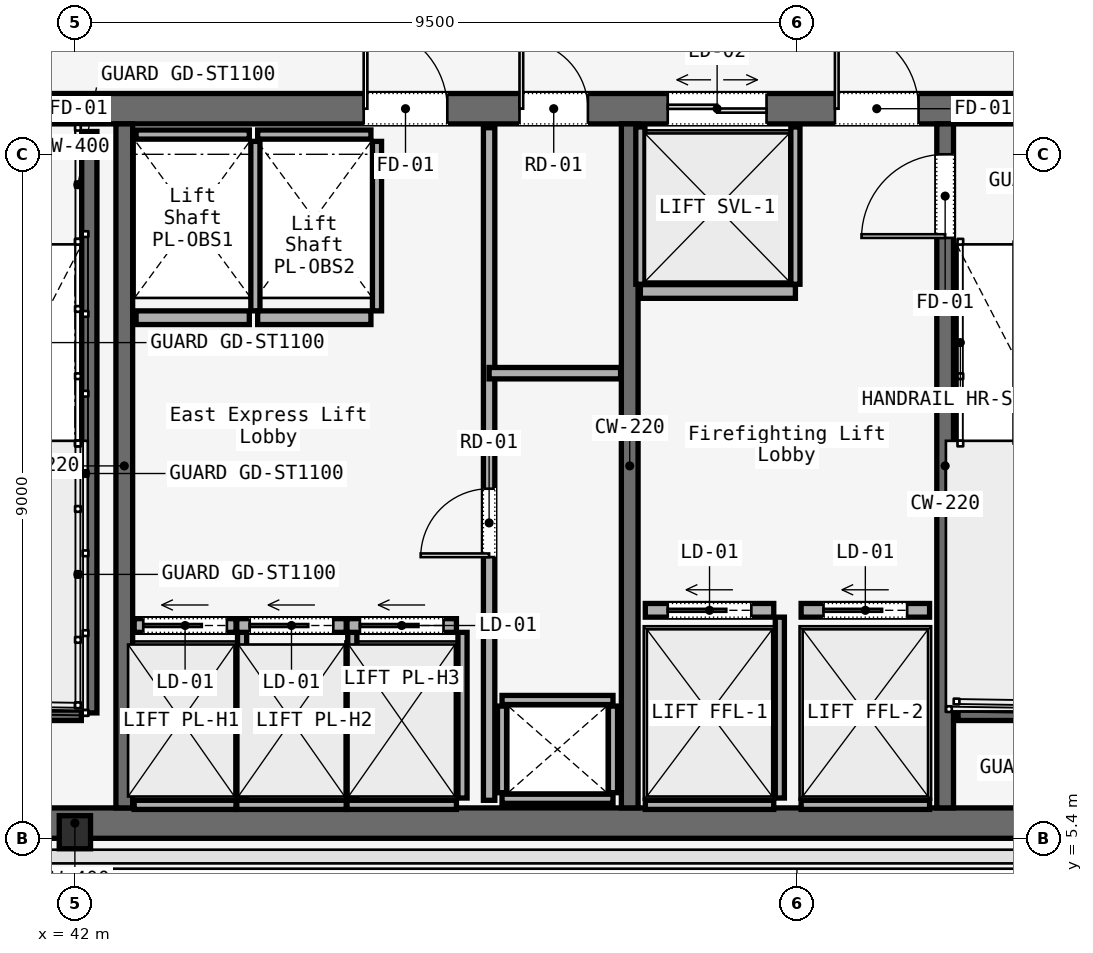
"""IFC4 building model, lengths in metres.
Left out: names, types, materials, properties, quantities, classifications, styles, units other than length and angle.
Written with IfcOpenShell. Run it as: python <this file> out.ifc"""

import sys

from ifc_helpers import new_model, si_unit, direction, frame, frame_2d, origin, origin_2d, place, context, subcontext, project, spatial, rectangle, i_section, extrude, element, fill, save


model = new_model("IFC4")
c1 = context("Model", 3, precision=1e-05, world=origin(), true_north=direction((0.0, 1.0)))
c2 = subcontext(c1, "Body", "Model", "MODEL_VIEW")
j1 = project(units=[si_unit("LENGTHUNIT", "METRE"), si_unit("PLANEANGLEUNIT", "RADIAN")], contexts=[c1])
p1 = place(None, origin())
s1 = spatial("IfcSite", under=j1, at=p1, CompositionType="ELEMENT")
p2 = place(p1, origin())
s2 = spatial("IfcBuilding", under=s1, at=p2, CompositionType="ELEMENT")
p3 = place(p2, frame((0.0, 0.0, 248.4)))
s3 = spatial("IfcBuildingStorey", under=s2, at=p3, CompositionType="ELEMENT", Elevation=248.4)
p4 = place(p3, frame((26.45, 15.0, 0.0), z_axis=(0.0, 0.0, 1.0), x_axis=(1.0, 0.0, 0.0)))
e1 = element("IfcWall", 1, at=p4, inside=s3, PredefinedType="SOLIDWALL", context=c2, shape_type="SweptSolid", body=[
    extrude(rectangle(XDim=31.1, YDim=0.4, at=frame_2d((15.55, 0.0))), origin(), (0.0, 0.0, 1.0), 3.58),
])
p5 = place(p4, frame((1.65, 0.0, 0.0)))
e2 = element("IfcOpeningElement", 2, at=p5, cuts=e1, PredefinedType="OPENING", context=c2, shape_type="SweptSolid", body=[
    extrude(rectangle(XDim=1.1, YDim=2.2, at=frame_2d((0.55, 1.1))), frame((0.0, 0.2, 0.0), z_axis=(0.0, -1.0, 0.0), x_axis=(1.0, 0.0, 0.0)), (0.0, 0.0, 1.0), 0.4),
])
p6 = place(p4, frame((13.65, 0.0, 0.0)))
e3 = element("IfcOpeningElement", 3, at=p6, cuts=e1, PredefinedType="OPENING", context=c2, shape_type="SweptSolid", body=[
    extrude(rectangle(XDim=1.1, YDim=2.2, at=frame_2d((0.55, 1.1))), frame((0.0, 0.2, 0.0), z_axis=(0.0, -1.0, 0.0), x_axis=(1.0, 0.0, 0.0)), (0.0, 0.0, 1.0), 0.4),
])
p7 = place(p4, frame((25.55, 0.0, 0.0)))
e4 = element("IfcOpeningElement", 4, at=p7, cuts=e1, PredefinedType="OPENING", context=c2, shape_type="SweptSolid", body=[
    extrude(rectangle(XDim=1.1, YDim=2.2, at=frame_2d((0.55, 1.1))), frame((0.0, 0.2, 0.0), z_axis=(0.0, -1.0, 0.0), x_axis=(1.0, 0.0, 0.0)), (0.0, 0.0, 1.0), 0.4),
])
p8 = place(p4, frame((19.35, 0.0, 0.0)))
e5 = element("IfcOpeningElement", 5, at=p8, cuts=e1, PredefinedType="OPENING", context=c2, shape_type="SweptSolid", body=[
    extrude(rectangle(XDim=1.1, YDim=2.2, at=frame_2d((0.55, 1.1))), frame((0.0, 0.2, 0.0), z_axis=(0.0, -1.0, 0.0), x_axis=(1.0, 0.0, 0.0)), (0.0, 0.0, 1.0), 0.4),
])
p9 = place(p4, frame((21.4, 0.0, 0.0)))
e6 = element("IfcOpeningElement", 6, at=p9, cuts=e1, PredefinedType="OPENING", context=c2, shape_type="SweptSolid", body=[
    extrude(rectangle(XDim=0.9, YDim=2.1, at=frame_2d((0.45, 1.05))), frame((0.0, 0.2, 0.0), z_axis=(0.0, -1.0, 0.0), x_axis=(1.0, 0.0, 0.0)), (0.0, 0.0, 1.0), 0.4),
])
p10 = place(p4, frame((5.14, 0.0, 0.0)))
e7 = element("IfcOpeningElement", 7, at=p10, cuts=e1, PredefinedType="OPENING", context=c2, shape_type="SweptSolid", body=[
    extrude(rectangle(XDim=0.95, YDim=2.2, at=frame_2d((0.475, 1.1))), frame((0.0, 0.2, 0.0), z_axis=(0.0, -1.0, 0.0), x_axis=(1.0, 0.0, 0.0)), (0.0, 0.0, 1.0), 0.4),
])
p11 = place(p4, frame((7.825, 0.0, 0.0)))
e8 = element("IfcOpeningElement", 8, at=p11, cuts=e1, PredefinedType="OPENING", context=c2, shape_type="SweptSolid", body=[
    extrude(rectangle(XDim=0.95, YDim=2.2, at=frame_2d((0.475, 1.1))), frame((0.0, 0.2, 0.0), z_axis=(0.0, -1.0, 0.0), x_axis=(1.0, 0.0, 0.0)), (0.0, 0.0, 1.0), 0.4),
])
p12 = place(p4, frame((10.46, 0.0, 0.0)))
e9 = element("IfcOpeningElement", 9, at=p12, cuts=e1, PredefinedType="OPENING", context=c2, shape_type="SweptSolid", body=[
    extrude(rectangle(XDim=0.95, YDim=2.2, at=frame_2d((0.475, 1.1))), frame((0.0, 0.2, 0.0), z_axis=(0.0, -1.0, 0.0), x_axis=(1.0, 0.0, 0.0)), (0.0, 0.0, 1.0), 0.4),
])
p13 = place(p4, frame((23.35, 0.0, 0.0)))
e10 = element("IfcOpeningElement", 10, at=p13, cuts=e1, PredefinedType="OPENING", context=c2, shape_type="SweptSolid", body=[
    extrude(rectangle(XDim=1.3, YDim=2.3, at=frame_2d((0.65, 1.15))), frame((0.0, 0.2, 0.0), z_axis=(0.0, -1.0, 0.0), x_axis=(1.0, 0.0, 0.0)), (0.0, 0.0, 1.0), 0.4),
])
p14 = place(p3, frame((26.45, 5.6, 0.0), z_axis=(0.0, 0.0, 1.0), x_axis=(1.0, 0.0, 0.0)))
e11 = element("IfcWall", 11, at=p14, inside=s3, PredefinedType="SOLIDWALL", context=c2, shape_type="SweptSolid", body=[
    extrude(rectangle(XDim=31.1, YDim=0.4, at=frame_2d((15.55, 0.0))), origin(), (0.0, 0.0, 1.0), 3.58),
])
for number, where, z_axis, x_axis in (
    (12, (42.65, 5.8, 0.0), (0.0, 0.0, 1.0), (0.0, 1.0, 0.0)),
    (13, (49.3, 5.8, 0.0), (0.0, 0.0, 1.0), (0.0, 1.0, 0.0)),
):
    element("IfcWall", number, at=place(p3, frame(where, z_axis=z_axis, x_axis=x_axis)), inside=s3, PredefinedType="SOLIDWALL", context=c2, shape_type="SweptSolid", body=[
        extrude(rectangle(XDim=9.0, YDim=0.22, at=frame_2d((4.5, 0.0))), origin(), (0.0, 0.0, 1.0), 3.58),
    ])
p15 = place(p3, frame((53.45, 5.8, 0.0), z_axis=(0.0, 0.0, 1.0), x_axis=(0.0, 1.0, 0.0)))
e14 = element("IfcWall", 14, at=p15, inside=s3, PredefinedType="SOLIDWALL", context=c2, shape_type="SweptSolid", body=[
    extrude(rectangle(XDim=9.0, YDim=0.22, at=frame_2d((4.5, 0.0))), origin(), (0.0, 0.0, 1.0), 3.58),
])
p16 = place(p15, frame((7.5, 0.0, 0.0)))
e15 = element("IfcOpeningElement", 15, at=p16, cuts=e14, PredefinedType="OPENING", context=c2, shape_type="SweptSolid", body=[
    extrude(rectangle(XDim=1.1, YDim=2.2, at=frame_2d((0.55, 1.1))), frame((0.0, 0.11, 0.0), z_axis=(0.0, -1.0, 0.0), x_axis=(1.0, 0.0, 0.0)), (0.0, 0.0, 1.0), 0.22),
])
p17 = place(p3, frame((42.0, 5.48, 0.0), z_axis=(0.0, 0.0, 1.0), x_axis=(1.0, 0.0, 0.0)))
e16 = element("IfcColumn", 16, at=p17, inside=s3, PredefinedType="COLUMN", context=c2, shape_type="SweptSolid", body=[
    extrude(i_section(OverallWidth=0.412, OverallDepth=0.435, WebThickness=0.036, FlangeThickness=0.044, FilletRadius=0.015, at=origin_2d()), origin(), (0.0, 0.0, 1.0), 3.58),
])
p18 = place(p3, frame((42.19, 14.7, 0.0), z_axis=(0.0, 0.0, 1.0), x_axis=(0.0, -1.0, 0.0)))
e17 = element("IfcWall", 17, at=p18, inside=s3, PredefinedType="SOLIDWALL", context=c2, shape_type="SweptSolid", body=[
    extrude(rectangle(XDim=7.65, YDim=0.2, at=frame_2d((3.825, 0.0))), origin(), (0.0, 0.0, 1.0), 3.8),
])
for number, where, z_axis, x_axis in (
    (18, (38.97, 7.05, 0.0), (0.0, 0.0, 1.0), (1.0, 0.0, 0.0)),
    (19, (53.62, 7.05, 0.0), (0.0, 0.0, 1.0), (1.0, 0.0, 0.0)),
):
    element("IfcWall", number, at=place(p3, frame(where, z_axis=z_axis, x_axis=x_axis)), inside=s3, PredefinedType="SOLIDWALL", context=c2, shape_type="SweptSolid", body=[
        extrude(rectangle(XDim=3.115, YDim=0.2, at=frame_2d((1.558, 0.0))), origin(), (0.0, 0.0, 1.0), 3.8),
    ])
for number, where, z_axis, x_axis in (
    (20, (47.62, 5.92, 0.0), (0.0, 0.0, 1.0), (1.0, 0.0, 0.0)),
    (21, (47.62, 7.22, 0.0), (0.0, 0.0, 1.0), (1.0, 0.0, 0.0)),
):
    element("IfcWall", number, at=place(p3, frame(where, z_axis=z_axis, x_axis=x_axis)), inside=s3, PredefinedType="SOLIDWALL", context=c2, shape_type="SweptSolid", body=[
        extrude(rectangle(XDim=1.46, YDim=0.12, at=frame_2d((0.73, 0.0))), origin(), (0.0, 0.0, 1.0), 3.01),
    ])
for number, where, z_axis, x_axis in (
    (22, (47.62, 6.0, 0.0), (0.0, 0.0, 1.0), (0.0, 1.0, 0.0)),
    (23, (49.08, 6.0, 0.0), (0.0, 0.0, 1.0), (0.0, 1.0, 0.0)),
):
    element("IfcWall", number, at=place(p3, frame(where, z_axis=z_axis, x_axis=x_axis)), inside=s3, PredefinedType="SOLIDWALL", context=c2, shape_type="SweptSolid", body=[
        extrude(rectangle(XDim=1.14, YDim=0.12, at=frame_2d((0.57, 0.0))), origin(), (0.0, 0.0, 1.0), 3.01),
    ])
p19 = place(p3, frame((47.45, 5.9, 0.0), z_axis=(0.0, 0.0, 1.0), x_axis=(0.0, 1.0, 0.0)))
e24 = element("IfcWall", 24, at=p19, inside=s3, PredefinedType="PARTITIONING", context=c2, shape_type="SweptSolid", body=[
    extrude(rectangle(XDim=8.85, YDim=0.15, at=frame_2d((4.425, 0.0))), origin(), (0.0, 0.0, 1.0), 3.01),
])
p20 = place(p19, frame((3.2, 0.0, 0.0)))
e25 = element("IfcOpeningElement", 25, at=p20, cuts=e24, PredefinedType="OPENING", context=c2, shape_type="SweptSolid", body=[
    extrude(rectangle(XDim=0.9, YDim=2.1, at=frame_2d((0.45, 1.05))), frame((0.0, 0.075, 0.0), z_axis=(0.0, -1.0, 0.0), x_axis=(1.0, 0.0, 0.0)), (0.0, 0.0, 1.0), 0.15),
])
p21 = place(p3, frame((47.45, 11.52, 0.0), z_axis=(0.0, 0.0, 1.0), x_axis=(1.0, 0.0, 0.0)))
e26 = element("IfcWall", 26, at=p21, inside=s3, PredefinedType="PARTITIONING", context=c2, shape_type="SweptSolid", body=[
    extrude(rectangle(XDim=1.73, YDim=0.15, at=frame_2d((0.865, 0.0))), origin(), (0.0, 0.0, 1.0), 3.01),
])
p22 = place(p3, frame((42.78, 8.2, 0.0), z_axis=(0.0, 0.0, 1.0), x_axis=(1.0, 0.0, 0.0)))
e27 = element("IfcWall", 27, at=p22, inside=s3, PredefinedType="SOLIDWALL", context=c2, shape_type="SweptSolid", body=[
    extrude(rectangle(XDim=1.34, YDim=0.18, at=frame_2d((0.67, 0.0))), origin(), (0.0, 0.0, 1.0), 3.01),
])
p23 = place(p22, frame((0.12, 0.0, 0.0)))
e28 = element("IfcOpeningElement", 28, at=p23, cuts=e27, PredefinedType="OPENING", context=c2, shape_type="SweptSolid", body=[
    extrude(rectangle(XDim=1.1, YDim=2.2, at=frame_2d((0.55, 1.1))), frame((0.0, 0.09, 0.0), z_axis=(0.0, -1.0, 0.0), x_axis=(1.0, 0.0, 0.0)), (0.0, 0.0, 1.0), 0.18),
])
p24 = place(p3, frame((42.78, 5.84, 0.0), z_axis=(0.0, 0.0, 1.0), x_axis=(1.0, 0.0, 0.0)))
e29 = element("IfcWall", 29, at=p24, inside=s3, PredefinedType="SOLIDWALL", context=c2, shape_type="SweptSolid", body=[
    extrude(rectangle(XDim=1.34, YDim=0.12, at=frame_2d((0.67, 0.0))), origin(), (0.0, 0.0, 1.0), 3.01),
])
p25 = place(p3, frame((44.2, 5.93, 0.0), z_axis=(0.0, 0.0, 1.0), x_axis=(0.0, 1.0, 0.0)))
e30 = element("IfcWall", 30, at=p25, inside=s3, PredefinedType="SOLIDWALL", context=c2, shape_type="SweptSolid", body=[
    extrude(rectangle(XDim=2.18, YDim=0.12, at=frame_2d((1.09, 0.0))), origin(), (0.0, 0.0, 1.0), 3.01),
])
p26 = place(p3, frame((44.13, 8.2, 0.0), z_axis=(0.0, 0.0, 1.0), x_axis=(1.0, 0.0, 0.0)))
e31 = element("IfcWall", 31, at=p26, inside=s3, PredefinedType="SOLIDWALL", context=c2, shape_type="SweptSolid", body=[
    extrude(rectangle(XDim=1.44, YDim=0.18, at=frame_2d((0.72, 0.0))), origin(), (0.0, 0.0, 1.0), 3.01),
])
p27 = place(p26, frame((0.17, 0.0, 0.0)))
e32 = element("IfcOpeningElement", 32, at=p27, cuts=e31, PredefinedType="OPENING", context=c2, shape_type="SweptSolid", body=[
    extrude(rectangle(XDim=1.1, YDim=2.2, at=frame_2d((0.55, 1.1))), frame((0.0, 0.09, 0.0), z_axis=(0.0, -1.0, 0.0), x_axis=(1.0, 0.0, 0.0)), (0.0, 0.0, 1.0), 0.18),
])
p28 = place(p3, frame((44.13, 5.84, 0.0), z_axis=(0.0, 0.0, 1.0), x_axis=(1.0, 0.0, 0.0)))
e33 = element("IfcWall", 33, at=p28, inside=s3, PredefinedType="SOLIDWALL", context=c2, shape_type="SweptSolid", body=[
    extrude(rectangle(XDim=1.44, YDim=0.12, at=frame_2d((0.72, 0.0))), origin(), (0.0, 0.0, 1.0), 3.01),
])
p29 = place(p3, frame((45.65, 5.93, 0.0), z_axis=(0.0, 0.0, 1.0), x_axis=(0.0, 1.0, 0.0)))
e34 = element("IfcWall", 34, at=p29, inside=s3, PredefinedType="SOLIDWALL", context=c2, shape_type="SweptSolid", body=[
    extrude(rectangle(XDim=2.18, YDim=0.12, at=frame_2d((1.09, 0.0))), origin(), (0.0, 0.0, 1.0), 3.01),
])
p30 = place(p3, frame((45.58, 8.2, 0.0), z_axis=(0.0, 0.0, 1.0), x_axis=(1.0, 0.0, 0.0)))
e35 = element("IfcWall", 35, at=p30, inside=s3, PredefinedType="SOLIDWALL", context=c2, shape_type="SweptSolid", body=[
    extrude(rectangle(XDim=1.44, YDim=0.18, at=frame_2d((0.72, 0.0))), origin(), (0.0, 0.0, 1.0), 3.01),
])
p31 = place(p30, frame((0.17, 0.0, 0.0)))
e36 = element("IfcOpeningElement", 36, at=p31, cuts=e35, PredefinedType="OPENING", context=c2, shape_type="SweptSolid", body=[
    extrude(rectangle(XDim=1.1, YDim=2.2, at=frame_2d((0.55, 1.1))), frame((0.0, 0.09, 0.0), z_axis=(0.0, -1.0, 0.0), x_axis=(1.0, 0.0, 0.0)), (0.0, 0.0, 1.0), 0.18),
])
p32 = place(p3, frame((45.58, 5.84, 0.0), z_axis=(0.0, 0.0, 1.0), x_axis=(1.0, 0.0, 0.0)))
e37 = element("IfcWall", 37, at=p32, inside=s3, PredefinedType="SOLIDWALL", context=c2, shape_type="SweptSolid", body=[
    extrude(rectangle(XDim=1.44, YDim=0.12, at=frame_2d((0.72, 0.0))), origin(), (0.0, 0.0, 1.0), 3.01),
])
p33 = place(p3, frame((47.1, 5.93, 0.0), z_axis=(0.0, 0.0, 1.0), x_axis=(0.0, 1.0, 0.0)))
e38 = element("IfcWall", 38, at=p33, inside=s3, PredefinedType="SOLIDWALL", context=c2, shape_type="SweptSolid", body=[
    extrude(rectangle(XDim=2.18, YDim=0.12, at=frame_2d((1.09, 0.0))), origin(), (0.0, 0.0, 1.0), 3.01),
])
p34 = place(p3, frame((42.805, 12.25, 0.0), z_axis=(0.0, 0.0, 1.0), x_axis=(1.0, 0.0, 0.0)))
e39 = element("IfcWall", 39, at=p34, inside=s3, PredefinedType="SOLIDWALL", context=c2, shape_type="SweptSolid", body=[
    extrude(rectangle(XDim=1.49, YDim=0.18, at=frame_2d((0.745, 0.0))), origin(), (0.0, 0.0, 1.0), 3.01),
])
p35 = place(p3, frame((42.805, 14.66, 0.0), z_axis=(0.0, 0.0, 1.0), x_axis=(1.0, 0.0, 0.0)))
e40 = element("IfcWall", 40, at=p35, inside=s3, PredefinedType="SOLIDWALL", context=c2, shape_type="SweptSolid", body=[
    extrude(rectangle(XDim=1.49, YDim=0.12, at=frame_2d((0.745, 0.0))), origin(), (0.0, 0.0, 1.0), 3.01),
])
p36 = place(p3, frame((44.375, 12.34, 0.0), z_axis=(0.0, 0.0, 1.0), x_axis=(0.0, 1.0, 0.0)))
e41 = element("IfcWall", 41, at=p36, inside=s3, PredefinedType="SOLIDWALL", context=c2, shape_type="SweptSolid", body=[
    extrude(rectangle(XDim=2.23, YDim=0.12, at=frame_2d((1.115, 0.0))), origin(), (0.0, 0.0, 1.0), 3.01),
])
p37 = place(p3, frame((44.405, 12.25, 0.0), z_axis=(0.0, 0.0, 1.0), x_axis=(1.0, 0.0, 0.0)))
e42 = element("IfcWall", 42, at=p37, inside=s3, PredefinedType="SOLIDWALL", context=c2, shape_type="SweptSolid", body=[
    extrude(rectangle(XDim=1.49, YDim=0.18, at=frame_2d((0.745, 0.0))), origin(), (0.0, 0.0, 1.0), 3.01),
])
p38 = place(p3, frame((44.405, 14.66, 0.0), z_axis=(0.0, 0.0, 1.0), x_axis=(1.0, 0.0, 0.0)))
e43 = element("IfcWall", 43, at=p38, inside=s3, PredefinedType="SOLIDWALL", context=c2, shape_type="SweptSolid", body=[
    extrude(rectangle(XDim=1.49, YDim=0.12, at=frame_2d((0.745, 0.0))), origin(), (0.0, 0.0, 1.0), 3.01),
])
p39 = place(p3, frame((45.975, 12.34, 0.0), z_axis=(0.0, 0.0, 1.0), x_axis=(0.0, 1.0, 0.0)))
e44 = element("IfcWall", 44, at=p39, inside=s3, PredefinedType="SOLIDWALL", context=c2, shape_type="SweptSolid", body=[
    extrude(rectangle(XDim=2.23, YDim=0.12, at=frame_2d((1.115, 0.0))), origin(), (0.0, 0.0, 1.0), 3.01),
])
p40 = place(p3, frame((49.505, 8.4, 0.0), z_axis=(0.0, 0.0, 1.0), x_axis=(1.0, 0.0, 0.0)))
e45 = element("IfcWall", 45, at=p40, inside=s3, PredefinedType="SOLIDWALL", context=c2, shape_type="SweptSolid", body=[
    extrude(rectangle(XDim=1.69, YDim=0.18, at=frame_2d((0.845, 0.0))), origin(), (0.0, 0.0, 1.0), 3.01),
])
p41 = place(p40, frame((0.295, 0.0, 0.0)))
e46 = element("IfcOpeningElement", 46, at=p41, cuts=e45, PredefinedType="OPENING", context=c2, shape_type="SweptSolid", body=[
    extrude(rectangle(XDim=1.1, YDim=2.2, at=frame_2d((0.55, 1.1))), frame((0.0, 0.09, 0.0), z_axis=(0.0, -1.0, 0.0), x_axis=(1.0, 0.0, 0.0)), (0.0, 0.0, 1.0), 0.18),
])
p42 = place(p3, frame((49.505, 5.84, 0.0), z_axis=(0.0, 0.0, 1.0), x_axis=(1.0, 0.0, 0.0)))
e47 = element("IfcWall", 47, at=p42, inside=s3, PredefinedType="SOLIDWALL", context=c2, shape_type="SweptSolid", body=[
    extrude(rectangle(XDim=1.69, YDim=0.12, at=frame_2d((0.845, 0.0))), origin(), (0.0, 0.0, 1.0), 3.01),
])
p43 = place(p3, frame((51.275, 5.93, 0.0), z_axis=(0.0, 0.0, 1.0), x_axis=(0.0, 1.0, 0.0)))
e48 = element("IfcWall", 48, at=p43, inside=s3, PredefinedType="SOLIDWALL", context=c2, shape_type="SweptSolid", body=[
    extrude(rectangle(XDim=2.38, YDim=0.12, at=frame_2d((1.19, 0.0))), origin(), (0.0, 0.0, 1.0), 3.01),
])
p44 = place(p3, frame((51.555, 8.4, 0.0), z_axis=(0.0, 0.0, 1.0), x_axis=(1.0, 0.0, 0.0)))
e49 = element("IfcWall", 49, at=p44, inside=s3, PredefinedType="SOLIDWALL", context=c2, shape_type="SweptSolid", body=[
    extrude(rectangle(XDim=1.69, YDim=0.18, at=frame_2d((0.845, 0.0))), origin(), (0.0, 0.0, 1.0), 3.01),
])
p45 = place(p44, frame((0.295, 0.0, 0.0)))
e50 = element("IfcOpeningElement", 50, at=p45, cuts=e49, PredefinedType="OPENING", context=c2, shape_type="SweptSolid", body=[
    extrude(rectangle(XDim=1.1, YDim=2.2, at=frame_2d((0.55, 1.1))), frame((0.0, 0.09, 0.0), z_axis=(0.0, -1.0, 0.0), x_axis=(1.0, 0.0, 0.0)), (0.0, 0.0, 1.0), 0.18),
])
p46 = place(p3, frame((51.555, 5.84, 0.0), z_axis=(0.0, 0.0, 1.0), x_axis=(1.0, 0.0, 0.0)))
e51 = element("IfcWall", 51, at=p46, inside=s3, PredefinedType="SOLIDWALL", context=c2, shape_type="SweptSolid", body=[
    extrude(rectangle(XDim=1.69, YDim=0.12, at=frame_2d((0.845, 0.0))), origin(), (0.0, 0.0, 1.0), 3.01),
])
p47 = place(p3, frame((49.44, 12.595, 0.0), z_axis=(0.0, 0.0, 1.0), x_axis=(1.0, 0.0, 0.0)))
e52 = element("IfcWall", 52, at=p47, inside=s3, PredefinedType="SOLIDWALL", context=c2, shape_type="SweptSolid", body=[
    extrude(rectangle(XDim=2.04, YDim=0.18, at=frame_2d((1.02, 0.0))), origin(), (0.0, 0.0, 1.0), 3.01),
])
for number, where, z_axis, x_axis in (
    (53, (49.44, 12.69, 0.0), (0.0, 0.0, 1.0), (0.0, 1.0, 0.0)),
    (54, (51.48, 12.69, 0.0), (0.0, 0.0, 1.0), (0.0, 1.0, 0.0)),
):
    element("IfcWall", number, at=place(p3, frame(where, z_axis=z_axis, x_axis=x_axis)), inside=s3, PredefinedType="SOLIDWALL", context=c2, shape_type="SweptSolid", body=[
        extrude(rectangle(XDim=2.07, YDim=0.12, at=frame_2d((1.035, 0.0))), origin(), (0.0, 0.0, 1.0), 3.01),
    ])
p48 = place(p7, origin())
e55 = element("IfcDoor", 55, at=p48, inside=s3, OperationType="SINGLE_SWING_RIGHT", PredefinedType="DOOR", context=c2, shape_type="SweptSolid", body=[
    extrude(rectangle(XDim=1.1, YDim=2.2, at=frame_2d((0.55, 1.1))), frame((0.0, 0.025, 0.0), z_axis=(0.0, -1.0, 0.0), x_axis=(1.0, 0.0, 0.0)), (0.0, 0.0, 1.0), 0.05),
])
fill(e4, e55)
p49 = place(p8, origin())
e56 = element("IfcDoor", 56, at=p49, inside=s3, OperationType="SINGLE_SWING_LEFT", PredefinedType="DOOR", context=c2, shape_type="SweptSolid", body=[
    extrude(rectangle(XDim=1.1, YDim=2.2, at=frame_2d((0.55, 1.1))), frame((0.0, 0.025, 0.0), z_axis=(0.0, -1.0, 0.0), x_axis=(1.0, 0.0, 0.0)), (0.0, 0.0, 1.0), 0.05),
])
fill(e5, e56)
p50 = place(p9, origin())
e57 = element("IfcDoor", 57, at=p50, inside=s3, OperationType="SINGLE_SWING_LEFT", PredefinedType="DOOR", context=c2, shape_type="SweptSolid", body=[
    extrude(rectangle(XDim=0.9, YDim=2.1, at=frame_2d((0.45, 1.05))), frame((0.0, 0.025, 0.0), z_axis=(0.0, -1.0, 0.0), x_axis=(1.0, 0.0, 0.0)), (0.0, 0.0, 1.0), 0.05),
])
fill(e6, e57)
p51 = place(p16, origin())
e58 = element("IfcDoor", 58, at=p51, inside=s3, OperationType="SINGLE_SWING_LEFT", PredefinedType="DOOR", context=c2, shape_type="SweptSolid", body=[
    extrude(rectangle(XDim=1.1, YDim=2.2, at=frame_2d((0.55, 1.1))), frame((0.0, 0.025, 0.0), z_axis=(0.0, -1.0, 0.0), x_axis=(1.0, 0.0, 0.0)), (0.0, 0.0, 1.0), 0.05),
])
fill(e15, e58)
p52 = place(p20, origin())
e59 = element("IfcDoor", 59, at=p52, inside=s3, OperationType="SINGLE_SWING_LEFT", PredefinedType="DOOR", context=c2, shape_type="SweptSolid", body=[
    extrude(rectangle(XDim=0.9, YDim=2.1, at=frame_2d((0.45, 1.05))), frame((0.0, 0.025, 0.0), z_axis=(0.0, -1.0, 0.0), x_axis=(1.0, 0.0, 0.0)), (0.0, 0.0, 1.0), 0.05),
])
fill(e25, e59)
p53 = place(p23, origin())
e60 = element("IfcDoor", 60, at=p53, inside=s3, OperationType="SLIDING_TO_LEFT", PredefinedType="DOOR", context=c2, shape_type="SweptSolid", body=[
    extrude(rectangle(XDim=1.1, YDim=2.2, at=frame_2d((0.55, 1.1))), frame((0.0, 0.025, 0.0), z_axis=(0.0, -1.0, 0.0), x_axis=(1.0, 0.0, 0.0)), (0.0, 0.0, 1.0), 0.05),
])
fill(e28, e60)
p54 = place(p27, origin())
e61 = element("IfcDoor", 61, at=p54, inside=s3, OperationType="SLIDING_TO_LEFT", PredefinedType="DOOR", context=c2, shape_type="SweptSolid", body=[
    extrude(rectangle(XDim=1.1, YDim=2.2, at=frame_2d((0.55, 1.1))), frame((0.0, 0.025, 0.0), z_axis=(0.0, -1.0, 0.0), x_axis=(1.0, 0.0, 0.0)), (0.0, 0.0, 1.0), 0.05),
])
fill(e32, e61)
p55 = place(p31, origin())
e62 = element("IfcDoor", 62, at=p55, inside=s3, OperationType="SLIDING_TO_LEFT", PredefinedType="DOOR", context=c2, shape_type="SweptSolid", body=[
    extrude(rectangle(XDim=1.1, YDim=2.2, at=frame_2d((0.55, 1.1))), frame((0.0, 0.025, 0.0), z_axis=(0.0, -1.0, 0.0), x_axis=(1.0, 0.0, 0.0)), (0.0, 0.0, 1.0), 0.05),
])
fill(e36, e62)
p56 = place(p41, origin())
e63 = element("IfcDoor", 63, at=p56, inside=s3, OperationType="SLIDING_TO_LEFT", PredefinedType="DOOR", context=c2, shape_type="SweptSolid", body=[
    extrude(rectangle(XDim=1.1, YDim=2.2, at=frame_2d((0.55, 1.1))), frame((0.0, 0.025, 0.0), z_axis=(0.0, -1.0, 0.0), x_axis=(1.0, 0.0, 0.0)), (0.0, 0.0, 1.0), 0.05),
])
fill(e46, e63)
p57 = place(p45, origin())
e64 = element("IfcDoor", 64, at=p57, inside=s3, OperationType="SLIDING_TO_LEFT", PredefinedType="DOOR", context=c2, shape_type="SweptSolid", body=[
    extrude(rectangle(XDim=1.1, YDim=2.2, at=frame_2d((0.55, 1.1))), frame((0.0, 0.025, 0.0), z_axis=(0.0, -1.0, 0.0), x_axis=(1.0, 0.0, 0.0)), (0.0, 0.0, 1.0), 0.05),
])
fill(e50, e64)
p58 = place(p13, origin())
e65 = element("IfcDoor", 65, at=p58, inside=s3, OperationType="DOUBLE_DOOR_SLIDING", PredefinedType="DOOR", context=c2, shape_type="SweptSolid", body=[
    extrude(rectangle(XDim=1.3, YDim=2.3, at=frame_2d((0.65, 1.15))), frame((0.0, 0.025, 0.0), z_axis=(0.0, -1.0, 0.0), x_axis=(1.0, 0.0, 0.0)), (0.0, 0.0, 1.0), 0.05),
])
fill(e10, e65)
save(model, sys.argv[1])
